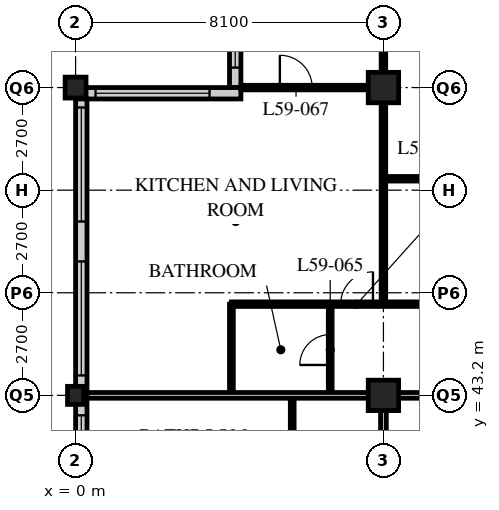
"""IFC4 building model, lengths in metres.
Left out: names, types, materials, properties, quantities, classifications, styles, units other than length and angle.
Written with IfcOpenShell. Run it as: python <this file> out.ifc"""

import sys

from ifc_helpers import new_model, si_unit, direction, frame, frame_2d, origin, origin_2d, place, context, subcontext, project, spatial, rectangle, hollow_rectangle, i_section, extrude, element, fill, save


model = new_model("IFC4")
c1 = context("Model", 3, precision=1e-05, world=origin(), true_north=direction((0.0, 1.0)))
c2 = subcontext(c1, "Body", "Model", "MODEL_VIEW")
j1 = project(units=[si_unit("LENGTHUNIT", "METRE"), si_unit("PLANEANGLEUNIT", "RADIAN")], contexts=[c1])
p1 = place(None, origin())
s1 = spatial("IfcSite", under=j1, at=p1, CompositionType="ELEMENT")
p2 = place(p1, origin())
s2 = spatial("IfcBuilding", under=s1, at=p2, CompositionType="ELEMENT")
p3 = place(p2, frame((0.0, 0.0, 228.0)))
s3 = spatial("IfcBuildingStorey", under=s2, at=p3, CompositionType="ELEMENT", Elevation=228.0)
p4 = place(p3, frame((0.0, 43.2, 0.0), z_axis=(0.0, 0.0, 1.0), x_axis=(1.0, 0.0, 0.0)))
e1 = element("IfcColumn", 1, at=p4, inside=s3, PredefinedType="COLUMN", context=c2, shape_type="SweptSolid", body=[
    extrude(i_section(OverallWidth=0.424, OverallDepth=0.475, WebThickness=0.048, FlangeThickness=0.077, FilletRadius=0.015, at=origin_2d()), origin(), (0.0, 0.0, 1.0), 3.6),
])
p5 = place(p3, frame((0.0, 51.3, 0.0), z_axis=(0.0, 0.0, 1.0), x_axis=(1.0, 0.0, 0.0)))
e2 = element("IfcColumn", 2, at=p5, inside=s3, PredefinedType="COLUMN", context=c2, shape_type="SweptSolid", body=[
    extrude(hollow_rectangle(XDim=0.55, YDim=0.55, WallThickness=0.045, at=origin_2d()), origin(), (0.0, 0.0, 1.0), 3.6),
])
for number, where, z_axis, x_axis in (
    (3, (8.1, 43.2, 0.0), (0.0, 0.0, 1.0), (1.0, 0.0, 0.0)),
    (4, (8.1, 51.3, 0.0), (0.0, 0.0, 1.0), (1.0, 0.0, 0.0)),
):
    element("IfcColumn", number, at=place(p3, frame(where, z_axis=z_axis, x_axis=x_axis)), inside=s3, PredefinedType="COLUMN", context=c2, shape_type="SweptSolid", body=[
        extrude(hollow_rectangle(XDim=0.8, YDim=0.8, WallThickness=0.08, at=origin_2d()), origin(), (0.0, 0.0, 1.0), 3.6),
    ])
p6 = place(p3, frame((4.2, 55.05, 0.0), z_axis=(0.0, 0.0, 1.0), x_axis=(0.0, -1.0, 0.0)))
e5 = element("IfcWall", 5, at=p6, inside=s3, PredefinedType="SOLIDWALL", context=c2, shape_type="SweptSolid", body=[
    extrude(rectangle(XDim=3.75, YDim=0.3, at=frame_2d((1.875, 0.0))), origin(), (0.0, 0.0, 1.0), 3.39),
])
p7 = place(p6, frame((0.225, 0.0, 0.6)))
e6 = element("IfcOpeningElement", 6, at=p7, cuts=e5, PredefinedType="OPENING", context=c2, shape_type="SweptSolid", body=[
    extrude(rectangle(XDim=3.0, YDim=2.0, at=frame_2d((1.5, 1.0))), frame((0.0, 0.16, 0.0), z_axis=(0.0, -1.0, 0.0), x_axis=(1.0, 0.0, 0.0)), (0.0, 0.0, 1.0), 0.32),
])
p8 = place(p3, frame((4.35, 51.15, 0.0), z_axis=(0.0, 0.0, 1.0), x_axis=(-1.0, 0.0, 0.0)))
e7 = element("IfcWall", 7, at=p8, inside=s3, PredefinedType="SOLIDWALL", context=c2, shape_type="SweptSolid", body=[
    extrude(rectangle(XDim=4.35, YDim=0.3, at=frame_2d((2.175, 0.0))), origin(), (0.0, 0.0, 1.0), 3.39),
])
p9 = place(p8, frame((0.825, 0.0, 0.6)))
e8 = element("IfcOpeningElement", 8, at=p9, cuts=e7, PredefinedType="OPENING", context=c2, shape_type="SweptSolid", body=[
    extrude(rectangle(XDim=3.0, YDim=2.0, at=frame_2d((1.5, 1.0))), frame((0.0, 0.16, 0.0), z_axis=(0.0, -1.0, 0.0), x_axis=(1.0, 0.0, 0.0)), (0.0, 0.0, 1.0), 0.32),
])
p10 = place(p3, frame((0.15, 51.0, 0.0), z_axis=(0.0, 0.0, 1.0), x_axis=(0.0, -1.0, 0.0)))
e9 = element("IfcWall", 9, at=p10, inside=s3, PredefinedType="SOLIDWALL", context=c2, shape_type="SweptSolid", body=[
    extrude(rectangle(XDim=32.1, YDim=0.3, at=frame_2d((16.05, 0.0))), origin(), (0.0, 0.0, 1.0), 3.39),
])
p11 = place(p10, frame((0.225, 0.0, 0.6)))
e10 = element("IfcOpeningElement", 10, at=p11, cuts=e9, PredefinedType="OPENING", context=c2, shape_type="SweptSolid", body=[
    extrude(rectangle(XDim=3.0, YDim=2.0, at=frame_2d((1.5, 1.0))), frame((0.0, 0.16, 0.0), z_axis=(0.0, -1.0, 0.0), x_axis=(1.0, 0.0, 0.0)), (0.0, 0.0, 1.0), 0.32),
])
p12 = place(p10, frame((4.275, 0.0, 0.6)))
e11 = element("IfcOpeningElement", 11, at=p12, cuts=e9, PredefinedType="OPENING", context=c2, shape_type="SweptSolid", body=[
    extrude(rectangle(XDim=3.0, YDim=2.0, at=frame_2d((1.5, 1.0))), frame((0.0, 0.16, 0.0), z_axis=(0.0, -1.0, 0.0), x_axis=(1.0, 0.0, 0.0)), (0.0, 0.0, 1.0), 0.32),
])
p13 = place(p10, frame((8.325, 0.0, 0.6)))
e12 = element("IfcOpeningElement", 12, at=p13, cuts=e9, PredefinedType="OPENING", context=c2, shape_type="SweptSolid", body=[
    extrude(rectangle(XDim=3.0, YDim=2.0, at=frame_2d((1.5, 1.0))), frame((0.0, 0.16, 0.0), z_axis=(0.0, -1.0, 0.0), x_axis=(1.0, 0.0, 0.0)), (0.0, 0.0, 1.0), 0.32),
])
p14 = place(p10, frame((12.375, 0.0, 0.6)))
e13 = element("IfcOpeningElement", 13, at=p14, cuts=e9, PredefinedType="OPENING", context=c2, shape_type="SweptSolid", body=[
    extrude(rectangle(XDim=3.0, YDim=2.0, at=frame_2d((1.5, 1.0))), frame((0.0, 0.16, 0.0), z_axis=(0.0, -1.0, 0.0), x_axis=(1.0, 0.0, 0.0)), (0.0, 0.0, 1.0), 0.32),
])
p15 = place(p10, frame((16.425, 0.0, 0.6)))
e14 = element("IfcOpeningElement", 14, at=p15, cuts=e9, PredefinedType="OPENING", context=c2, shape_type="SweptSolid", body=[
    extrude(rectangle(XDim=3.0, YDim=2.0, at=frame_2d((1.5, 1.0))), frame((0.0, 0.16, 0.0), z_axis=(0.0, -1.0, 0.0), x_axis=(1.0, 0.0, 0.0)), (0.0, 0.0, 1.0), 0.32),
])
p16 = place(p10, frame((20.475, 0.0, 0.6)))
e15 = element("IfcOpeningElement", 15, at=p16, cuts=e9, PredefinedType="OPENING", context=c2, shape_type="SweptSolid", body=[
    extrude(rectangle(XDim=3.0, YDim=2.0, at=frame_2d((1.5, 1.0))), frame((0.0, 0.16, 0.0), z_axis=(0.0, -1.0, 0.0), x_axis=(1.0, 0.0, 0.0)), (0.0, 0.0, 1.0), 0.32),
])
p17 = place(p10, frame((24.525, 0.0, 0.6)))
e16 = element("IfcOpeningElement", 16, at=p17, cuts=e9, PredefinedType="OPENING", context=c2, shape_type="SweptSolid", body=[
    extrude(rectangle(XDim=3.0, YDim=2.0, at=frame_2d((1.5, 1.0))), frame((0.0, 0.16, 0.0), z_axis=(0.0, -1.0, 0.0), x_axis=(1.0, 0.0, 0.0)), (0.0, 0.0, 1.0), 0.32),
])
p18 = place(p10, frame((28.575, 0.0, 0.6)))
e17 = element("IfcOpeningElement", 17, at=p18, cuts=e9, PredefinedType="OPENING", context=c2, shape_type="SweptSolid", body=[
    extrude(rectangle(XDim=3.0, YDim=2.0, at=frame_2d((1.5, 1.0))), frame((0.0, 0.16, 0.0), z_axis=(0.0, -1.0, 0.0), x_axis=(1.0, 0.0, 0.0)), (0.0, 0.0, 1.0), 0.32),
])
p19 = place(p3, frame((8.1, 43.2, 0.0), z_axis=(0.0, 0.0, 1.0), x_axis=(1.0, 0.0, 0.0)))
e18 = element("IfcWall", 18, at=p19, inside=s3, PredefinedType="PARTITIONING", context=c2, shape_type="SweptSolid", body=[
    extrude(rectangle(XDim=36.45, YDim=0.15, at=frame_2d((18.225, 0.0))), origin(), (0.0, 0.0, 1.0), 2.628),
])
p20 = place(p19, frame((4.45, 0.0, 0.0)))
e19 = element("IfcOpeningElement", 19, at=p20, cuts=e18, PredefinedType="OPENING", context=c2, shape_type="SweptSolid", body=[
    extrude(rectangle(XDim=1.0, YDim=2.1, at=frame_2d((0.5, 1.05))), frame((0.0, 0.085, 0.0), z_axis=(0.0, -1.0, 0.0), x_axis=(1.0, 0.0, 0.0)), (0.0, 0.0, 1.0), 0.17),
])
p21 = place(p19, frame((17.1, 0.0, 0.0)))
e20 = element("IfcOpeningElement", 20, at=p21, cuts=e18, PredefinedType="OPENING", context=c2, shape_type="SweptSolid", body=[
    extrude(rectangle(XDim=1.0, YDim=2.1, at=frame_2d((0.5, 1.05))), frame((0.0, 0.085, 0.0), z_axis=(0.0, -1.0, 0.0), x_axis=(1.0, 0.0, 0.0)), (0.0, 0.0, 1.0), 0.17),
])
p22 = place(p19, frame((29.05, 0.0, 0.0)))
e21 = element("IfcOpeningElement", 21, at=p22, cuts=e18, PredefinedType="OPENING", context=c2, shape_type="SweptSolid", body=[
    extrude(rectangle(XDim=1.0, YDim=2.1, at=frame_2d((0.5, 1.05))), frame((0.0, 0.085, 0.0), z_axis=(0.0, -1.0, 0.0), x_axis=(1.0, 0.0, 0.0)), (0.0, 0.0, 1.0), 0.17),
])
p23 = place(p19, frame((33.925, 0.0, 0.0)))
e22 = element("IfcOpeningElement", 22, at=p23, cuts=e18, PredefinedType="OPENING", context=c2, shape_type="SweptSolid", body=[
    extrude(rectangle(XDim=1.0, YDim=2.1, at=frame_2d((0.5, 1.05))), frame((0.0, 0.085, 0.0), z_axis=(0.0, -1.0, 0.0), x_axis=(1.0, 0.0, 0.0)), (0.0, 0.0, 1.0), 0.17),
])
p24 = place(p19, frame((1.525, 0.0, 0.0)))
e23 = element("IfcOpeningElement", 23, at=p24, cuts=e18, PredefinedType="OPENING", context=c2, shape_type="SweptSolid", body=[
    extrude(rectangle(XDim=1.0, YDim=2.1, at=frame_2d((0.5, 1.05))), frame((0.0, 0.085, 0.0), z_axis=(0.0, -1.0, 0.0), x_axis=(1.0, 0.0, 0.0)), (0.0, 0.0, 1.0), 0.17),
])
p25 = place(p3, frame((8.1, 18.9, 0.0), z_axis=(0.0, 0.0, 1.0), x_axis=(0.0, 1.0, 0.0)))
e24 = element("IfcWall", 24, at=p25, inside=s3, PredefinedType="PARTITIONING", context=c2, shape_type="SweptSolid", body=[
    extrude(rectangle(XDim=24.3, YDim=0.15, at=frame_2d((12.15, 0.0))), origin(), (0.0, 0.0, 1.0), 2.628),
])
p26 = place(p25, frame((0.9, 0.0, 0.0)))
e25 = element("IfcOpeningElement", 25, at=p26, cuts=e24, PredefinedType="OPENING", context=c2, shape_type="SweptSolid", body=[
    extrude(rectangle(XDim=1.0, YDim=2.1, at=frame_2d((0.5, 1.05))), frame((0.0, 0.085, 0.0), z_axis=(0.0, -1.0, 0.0), x_axis=(1.0, 0.0, 0.0)), (0.0, 0.0, 1.0), 0.17),
])
p27 = place(p25, frame((20.95, 0.0, 0.0)))
e26 = element("IfcOpeningElement", 26, at=p27, cuts=e24, PredefinedType="OPENING", context=c2, shape_type="SweptSolid", body=[
    extrude(rectangle(XDim=1.0, YDim=2.1, at=frame_2d((0.5, 1.05))), frame((0.0, 0.085, 0.0), z_axis=(0.0, -1.0, 0.0), x_axis=(1.0, 0.0, 0.0)), (0.0, 0.0, 1.0), 0.17),
])
p28 = place(p3, frame((5.7, 41.0, 0.0), z_axis=(0.0, 0.0, 1.0), x_axis=(0.0, 1.0, 0.0)))
e27 = element("IfcWall", 27, at=p28, inside=s3, PredefinedType="PARTITIONING", context=c2, shape_type="SweptSolid", body=[
    extrude(rectangle(XDim=2.2, YDim=0.1, at=frame_2d((1.1, 0.0))), origin(), (0.0, 0.0, 1.0), 3.39),
])
p29 = place(p3, frame((6.7, 43.2, 0.0), z_axis=(0.0, 0.0, 1.0), x_axis=(0.0, 1.0, 0.0)))
e28 = element("IfcWall", 28, at=p29, inside=s3, PredefinedType="PARTITIONING", context=c2, shape_type="SweptSolid", body=[
    extrude(rectangle(XDim=2.4, YDim=0.1, at=frame_2d((1.2, 0.0))), origin(), (0.0, 0.0, 1.0), 3.39),
])
p30 = place(p29, frame((0.8, 0.0, 0.0)))
e29 = element("IfcOpeningElement", 29, at=p30, cuts=e28, PredefinedType="OPENING", context=c2, shape_type="SweptSolid", body=[
    extrude(rectangle(XDim=0.8, YDim=2.1, at=frame_2d((0.4, 1.05))), frame((0.0, 0.06, 0.0), z_axis=(0.0, -1.0, 0.0), x_axis=(1.0, 0.0, 0.0)), (0.0, 0.0, 1.0), 0.12),
])
p31 = place(p3, frame((4.1, 43.2, 0.0), z_axis=(0.0, 0.0, 1.0), x_axis=(0.0, 1.0, 0.0)))
e30 = element("IfcWall", 30, at=p31, inside=s3, PredefinedType="PARTITIONING", context=c2, shape_type="SweptSolid", body=[
    extrude(rectangle(XDim=2.4, YDim=0.1, at=frame_2d((1.2, 0.0))), origin(), (0.0, 0.0, 1.0), 3.39),
])
p32 = place(p3, frame((4.1, 45.6, 0.0), z_axis=(0.0, 0.0, 1.0), x_axis=(1.0, 0.0, 0.0)))
e31 = element("IfcWall", 31, at=p32, inside=s3, PredefinedType="PARTITIONING", context=c2, shape_type="SweptSolid", body=[
    extrude(rectangle(XDim=32.35, YDim=0.12, at=frame_2d((16.175, 0.0))), origin(), (0.0, 0.0, 1.0), 3.39),
])
p33 = place(p32, frame((9.025, 0.0, 0.0)))
e32 = element("IfcOpeningElement", 32, at=p33, cuts=e31, PredefinedType="OPENING", context=c2, shape_type="SweptSolid", body=[
    extrude(rectangle(XDim=0.85, YDim=2.1, at=frame_2d((0.425, 1.05))), frame((0.0, 0.07, 0.0), z_axis=(0.0, -1.0, 0.0), x_axis=(1.0, 0.0, 0.0)), (0.0, 0.0, 1.0), 0.14),
])
p34 = place(p32, frame((16.475, 0.0, 0.0)))
e33 = element("IfcOpeningElement", 33, at=p34, cuts=e31, PredefinedType="OPENING", context=c2, shape_type="SweptSolid", body=[
    extrude(rectangle(XDim=0.85, YDim=2.1, at=frame_2d((0.425, 1.05))), frame((0.0, 0.07, 0.0), z_axis=(0.0, -1.0, 0.0), x_axis=(1.0, 0.0, 0.0)), (0.0, 0.0, 1.0), 0.14),
])
p35 = place(p32, frame((21.175, 0.0, 0.0)))
e34 = element("IfcOpeningElement", 34, at=p35, cuts=e31, PredefinedType="OPENING", context=c2, shape_type="SweptSolid", body=[
    extrude(rectangle(XDim=0.85, YDim=2.1, at=frame_2d((0.425, 1.05))), frame((0.0, 0.07, 0.0), z_axis=(0.0, -1.0, 0.0), x_axis=(1.0, 0.0, 0.0)), (0.0, 0.0, 1.0), 0.14),
])
p36 = place(p32, frame((28.625, 0.0, 0.0)))
e35 = element("IfcOpeningElement", 35, at=p36, cuts=e31, PredefinedType="OPENING", context=c2, shape_type="SweptSolid", body=[
    extrude(rectangle(XDim=0.85, YDim=2.1, at=frame_2d((0.425, 1.05))), frame((0.0, 0.07, 0.0), z_axis=(0.0, -1.0, 0.0), x_axis=(1.0, 0.0, 0.0)), (0.0, 0.0, 1.0), 0.14),
])
p37 = place(p32, frame((6.725, 0.0, 0.0)))
e36 = element("IfcOpeningElement", 36, at=p37, cuts=e31, PredefinedType="OPENING", context=c2, shape_type="SweptSolid", body=[
    extrude(rectangle(XDim=0.85, YDim=2.1, at=frame_2d((0.425, 1.05))), frame((0.0, 0.07, 0.0), z_axis=(0.0, -1.0, 0.0), x_axis=(1.0, 0.0, 0.0)), (0.0, 0.0, 1.0), 0.14),
])
p38 = place(p32, frame((2.875, 0.0, 0.0)))
e37 = element("IfcOpeningElement", 37, at=p38, cuts=e31, PredefinedType="OPENING", context=c2, shape_type="SweptSolid", body=[
    extrude(rectangle(XDim=0.85, YDim=2.1, at=frame_2d((0.425, 1.05))), frame((0.0, 0.07, 0.0), z_axis=(0.0, -1.0, 0.0), x_axis=(1.0, 0.0, 0.0)), (0.0, 0.0, 1.0), 0.14),
])
p39 = place(p3, frame((8.1, 45.6, 0.0), z_axis=(0.0, 0.0, 1.0), x_axis=(0.0, 1.0, 0.0)))
e38 = element("IfcWall", 38, at=p39, inside=s3, PredefinedType="PARTITIONING", context=c2, shape_type="SweptSolid", body=[
    extrude(rectangle(XDim=9.45, YDim=0.12, at=frame_2d((4.725, 0.0))), origin(), (0.0, 0.0, 1.0), 2.628),
])
p40 = place(p3, frame((8.1, 51.3, 0.0), z_axis=(0.0, 0.0, 1.0), x_axis=(-1.0, 0.0, 0.0)))
e39 = element("IfcWall", 39, at=p40, inside=s3, PredefinedType="PARTITIONING", context=c2, shape_type="SweptSolid", body=[
    extrude(rectangle(XDim=3.75, YDim=0.12, at=frame_2d((1.875, 0.0))), origin(), (0.0, 0.0, 1.0), 2.628),
])
p41 = place(p40, frame((1.875, 0.0, 0.0)))
e40 = element("IfcOpeningElement", 40, at=p41, cuts=e39, PredefinedType="OPENING", context=c2, shape_type="SweptSolid", body=[
    extrude(rectangle(XDim=0.85, YDim=2.1, at=frame_2d((0.425, 1.05))), frame((0.0, 0.07, 0.0), z_axis=(0.0, -1.0, 0.0), x_axis=(1.0, 0.0, 0.0)), (0.0, 0.0, 1.0), 0.14),
])
p42 = place(p3, frame((0.3, 43.2, 0.0), z_axis=(0.0, 0.0, 1.0), x_axis=(1.0, 0.0, 0.0)))
e41 = element("IfcWall", 41, at=p42, inside=s3, PredefinedType="PARTITIONING", context=c2, shape_type="SweptSolid", body=[
    extrude(rectangle(XDim=7.8, YDim=0.15, at=frame_2d((3.9, 0.0))), origin(), (0.0, 0.0, 1.0), 2.628),
])
p43 = place(p3, frame((8.1, 48.9, 0.0), z_axis=(0.0, 0.0, 1.0), x_axis=(1.0, 0.0, 0.0)))
e42 = element("IfcWall", 42, at=p43, inside=s3, PredefinedType="PARTITIONING", context=c2, shape_type="SweptSolid", body=[
    extrude(rectangle(XDim=4.05, YDim=0.12, at=frame_2d((2.025, 0.0))), origin(), (0.0, 0.0, 1.0), 3.39),
])
p44 = place(p43, frame((1.6, 0.0, 0.0)))
e43 = element("IfcOpeningElement", 43, at=p44, cuts=e42, PredefinedType="OPENING", context=c2, shape_type="SweptSolid", body=[
    extrude(rectangle(XDim=0.85, YDim=2.1, at=frame_2d((0.425, 1.05))), frame((0.0, 0.07, 0.0), z_axis=(0.0, -1.0, 0.0), x_axis=(1.0, 0.0, 0.0)), (0.0, 0.0, 1.0), 0.14),
])
p45 = place(p7, origin())
e44 = element("IfcWindow", 44, at=p45, inside=s3, PartitioningType="SINGLE_PANEL", PredefinedType="WINDOW", context=c2, shape_type="SweptSolid", body=[
    extrude(rectangle(XDim=3.0, YDim=2.0, at=frame_2d((1.5, 1.0))), frame((0.0, 0.03, 0.0), z_axis=(0.0, -1.0, 0.0), x_axis=(1.0, 0.0, 0.0)), (0.0, 0.0, 1.0), 0.06),
])
fill(e6, e44)
p46 = place(p9, origin())
e45 = element("IfcWindow", 45, at=p46, inside=s3, PartitioningType="SINGLE_PANEL", PredefinedType="WINDOW", context=c2, shape_type="SweptSolid", body=[
    extrude(rectangle(XDim=3.0, YDim=2.0, at=frame_2d((1.5, 1.0))), frame((0.0, 0.03, 0.0), z_axis=(0.0, -1.0, 0.0), x_axis=(1.0, 0.0, 0.0)), (0.0, 0.0, 1.0), 0.06),
])
fill(e8, e45)
p47 = place(p11, origin())
e46 = element("IfcWindow", 46, at=p47, inside=s3, PartitioningType="SINGLE_PANEL", PredefinedType="WINDOW", context=c2, shape_type="SweptSolid", body=[
    extrude(rectangle(XDim=3.0, YDim=2.0, at=frame_2d((1.5, 1.0))), frame((0.0, 0.03, 0.0), z_axis=(0.0, -1.0, 0.0), x_axis=(1.0, 0.0, 0.0)), (0.0, 0.0, 1.0), 0.06),
])
fill(e10, e46)
p48 = place(p12, origin())
e47 = element("IfcWindow", 47, at=p48, inside=s3, PartitioningType="SINGLE_PANEL", PredefinedType="WINDOW", context=c2, shape_type="SweptSolid", body=[
    extrude(rectangle(XDim=3.0, YDim=2.0, at=frame_2d((1.5, 1.0))), frame((0.0, 0.03, 0.0), z_axis=(0.0, -1.0, 0.0), x_axis=(1.0, 0.0, 0.0)), (0.0, 0.0, 1.0), 0.06),
])
fill(e11, e47)
p49 = place(p13, origin())
e48 = element("IfcWindow", 48, at=p49, inside=s3, PartitioningType="SINGLE_PANEL", PredefinedType="WINDOW", context=c2, shape_type="SweptSolid", body=[
    extrude(rectangle(XDim=3.0, YDim=2.0, at=frame_2d((1.5, 1.0))), frame((0.0, 0.03, 0.0), z_axis=(0.0, -1.0, 0.0), x_axis=(1.0, 0.0, 0.0)), (0.0, 0.0, 1.0), 0.06),
])
fill(e12, e48)
p50 = place(p30, origin())
e49 = element("IfcDoor", 49, at=p50, inside=s3, OperationType="SINGLE_SWING_LEFT", PredefinedType="DOOR", context=c2, shape_type="SweptSolid", body=[
    extrude(rectangle(XDim=0.8, YDim=2.1, at=frame_2d((0.4, 1.05))), frame((0.0, 0.025, 0.0), z_axis=(0.0, -1.0, 0.0), x_axis=(1.0, 0.0, 0.0)), (0.0, 0.0, 1.0), 0.05),
])
fill(e29, e49)
p51 = place(p38, origin())
e50 = element("IfcDoor", 50, at=p51, inside=s3, OperationType="SINGLE_SWING_RIGHT", PredefinedType="DOOR", context=c2, shape_type="SweptSolid", body=[
    extrude(rectangle(XDim=0.85, YDim=2.1, at=frame_2d((0.425, 1.05))), frame((0.0, 0.025, 0.0), z_axis=(0.0, -1.0, 0.0), x_axis=(1.0, 0.0, 0.0)), (0.0, 0.0, 1.0), 0.05),
])
fill(e37, e50)
p52 = place(p41, origin())
e51 = element("IfcDoor", 51, at=p52, inside=s3, OperationType="SINGLE_SWING_LEFT", PredefinedType="DOOR", context=c2, shape_type="SweptSolid", body=[
    extrude(rectangle(XDim=0.85, YDim=2.1, at=frame_2d((0.425, 1.05))), frame((0.0, 0.025, 0.0), z_axis=(0.0, -1.0, 0.0), x_axis=(1.0, 0.0, 0.0)), (0.0, 0.0, 1.0), 0.05),
])
fill(e40, e51)
save(model, sys.argv[1])
